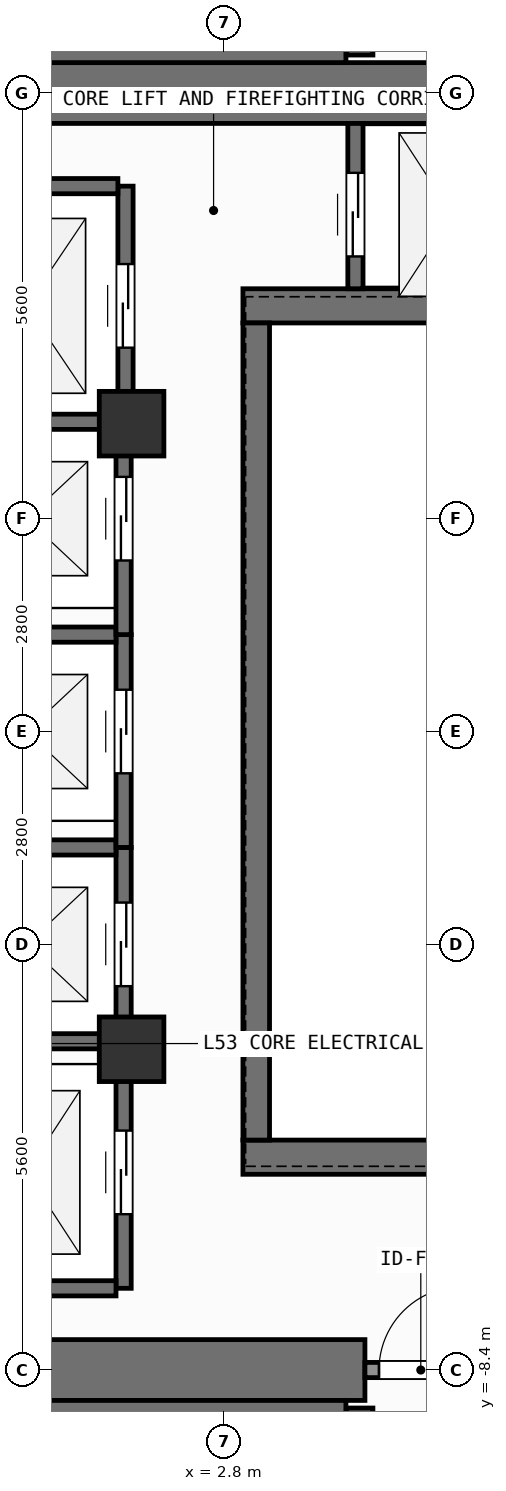
"""IFC4 building model, lengths in metres.
Left out: names, types, materials, properties, quantities, classifications, styles, units other than length and angle.
Written with IfcOpenShell. Run it as: python <this file> out.ifc"""

import sys

from ifc_helpers import new_model, si_unit, direction, frame, frame_2d, origin, origin_2d, place, context, subcontext, project, spatial, rectangle, extrude, element, fill, save


model = new_model("IFC4")
c1 = context("Model", 3, precision=1e-05, world=origin(), true_north=direction((0.0, 1.0)))
c2 = subcontext(c1, "Body", "Model", "MODEL_VIEW")
j1 = project(units=[si_unit("LENGTHUNIT", "METRE"), si_unit("PLANEANGLEUNIT", "RADIAN")], contexts=[c1])
p1 = place(None, origin())
s1 = spatial("IfcSite", under=j1, at=p1, CompositionType="ELEMENT")
p2 = place(p1, origin())
s2 = spatial("IfcBuilding", under=s1, at=p2, CompositionType="ELEMENT")
p3 = place(p2, frame((0.0, 0.0, 215.7)))
s3 = spatial("IfcBuildingStorey", under=s2, at=p3, CompositionType="ELEMENT", Elevation=215.7)
p4 = place(p3, frame((-2.62, -8.4, 0.0), z_axis=(0.0, 0.0, 1.0), x_axis=(1.0, 0.0, 0.0)))
e1 = element("IfcWall", 1, at=p4, inside=s3, PredefinedType="SHEAR", context=c2, shape_type="SweptSolid", body=[
    extrude(rectangle(XDim=7.27, YDim=0.8, at=frame_2d((3.635, 0.0))), origin(), (0.0, 0.0, 1.0), 3.9),
])
p5 = place(p3, frame((-7.55, 8.4, 0.0), z_axis=(0.0, 0.0, 1.0), x_axis=(1.0, 0.0, 0.0)))
e2 = element("IfcWall", 2, at=p5, inside=s3, PredefinedType="SHEAR", context=c2, shape_type="SweptSolid", body=[
    extrude(rectangle(XDim=16.35, YDim=0.8, at=frame_2d((8.175, 0.0))), origin(), (0.0, 0.0, 1.0), 3.9),
])
for number, where, z_axis, x_axis in (
    (3, (3.045, -5.6, 0.0), (0.0, 0.0, 1.0), (1.0, 0.0, 0.0)),
    (4, (3.045, 5.6, 0.0), (0.0, 0.0, 1.0), (1.0, 0.0, 0.0)),
):
    element("IfcWall", number, at=place(p3, frame(where, z_axis=z_axis, x_axis=x_axis)), inside=s3, PredefinedType="SHEAR", context=c2, shape_type="SweptSolid", body=[
        extrude(rectangle(XDim=5.755, YDim=0.45, at=frame_2d((2.877, 0.0))), origin(), (0.0, 0.0, 1.0), 3.9),
    ])
p6 = place(p3, frame((3.22, -5.375, 0.0), z_axis=(0.0, 0.0, 1.0), x_axis=(0.0, 1.0, 0.0)))
e5 = element("IfcWall", 5, at=p6, inside=s3, PredefinedType="SHEAR", context=c2, shape_type="SweptSolid", body=[
    extrude(rectangle(XDim=10.75, YDim=0.35, at=frame_2d((5.375, 0.0))), origin(), (0.0, 0.0, 1.0), 3.9),
])
p7 = place(p3, frame((-2.2, -8.913, 0.0), z_axis=(0.0, 0.0, 1.0), x_axis=(1.0, 0.0, 0.0)))
e6 = element("IfcWall", 6, at=p7, inside=s3, PredefinedType="SHEAR", context=c2, shape_type="SweptSolid", body=[
    extrude(rectangle(XDim=6.6, YDim=0.225, at=frame_2d((3.3, 0.0))), origin(), (0.0, 0.0, 1.0), 3.9),
])
p8 = place(p3, frame((4.58, -8.9, 0.0), z_axis=(0.0, 0.0, 1.0), x_axis=(0.0, -1.0, 0.0)))
e7 = element("IfcWall", 7, at=p8, inside=s3, PredefinedType="SHEAR", context=c2, shape_type="SweptSolid", body=[
    extrude(rectangle(XDim=2.925, YDim=0.35, at=frame_2d((1.462, 0.0))), origin(), (0.0, 0.0, 1.0), 3.9),
])
p9 = place(p8, frame((0.913, 0.0, 0.0)))
e8 = element("IfcOpeningElement", 8, at=p9, cuts=e7, PredefinedType="OPENING", context=c2, shape_type="SweptSolid", body=[
    extrude(rectangle(XDim=1.1, YDim=2.15, at=frame_2d((0.55, 1.075))), frame((0.0, 0.185, 0.0), z_axis=(0.0, -1.0, 0.0), x_axis=(1.0, 0.0, 0.0)), (0.0, 0.0, 1.0), 0.37),
])
p10 = place(p3, frame((-2.2, 8.913, 0.0), z_axis=(0.0, 0.0, 1.0), x_axis=(1.0, 0.0, 0.0)))
e9 = element("IfcWall", 9, at=p10, inside=s3, PredefinedType="SHEAR", context=c2, shape_type="SweptSolid", body=[
    extrude(rectangle(XDim=6.6, YDim=0.225, at=frame_2d((3.3, 0.0))), origin(), (0.0, 0.0, 1.0), 3.9),
])
p11 = place(p3, frame((4.58, 11.825, 0.0), z_axis=(0.0, 0.0, 1.0), x_axis=(0.0, -1.0, 0.0)))
e10 = element("IfcWall", 10, at=p11, inside=s3, PredefinedType="SHEAR", context=c2, shape_type="SweptSolid", body=[
    extrude(rectangle(XDim=2.925, YDim=0.35, at=frame_2d((1.462, 0.0))), origin(), (0.0, 0.0, 1.0), 3.9),
])
p12 = place(p11, frame((0.913, 0.0, 0.0)))
e11 = element("IfcOpeningElement", 11, at=p12, cuts=e10, PredefinedType="OPENING", context=c2, shape_type="SweptSolid", body=[
    extrude(rectangle(XDim=1.1, YDim=2.15, at=frame_2d((0.55, 1.075))), frame((0.0, 0.185, 0.0), z_axis=(0.0, -1.0, 0.0), x_axis=(1.0, 0.0, 0.0)), (0.0, 0.0, 1.0), 0.37),
])
for number, where, z_axis, x_axis in (
    (12, (1.58, -4.18, 0.0), (0.0, 0.0, 1.0), (1.0, 0.0, 0.0)),
    (13, (1.58, 4.05, 0.0), (0.0, 0.0, 1.0), (1.0, 0.0, 0.0)),
):
    element("IfcColumn", number, at=place(p3, frame(where, z_axis=z_axis, x_axis=x_axis)), inside=s3, PredefinedType="COLUMN", context=c2, shape_type="SweptSolid", body=[
        extrude(rectangle(XDim=0.85, YDim=0.85, at=origin_2d()), origin(), (0.0, 0.0, 1.0), 3.9),
    ])
p13 = place(p3, frame((1.475, -4.275, 0.0), z_axis=(0.0, 0.0, 1.0), x_axis=(0.0, 1.0, 0.0)))
e14 = element("IfcWall", 14, at=p13, inside=s3, PredefinedType="SHEAR", context=c2, shape_type="SweptSolid", body=[
    extrude(rectangle(XDim=2.75, YDim=0.2, at=frame_2d((1.375, 0.0))), origin(), (0.0, 0.0, 1.0), 3.62),
])
p14 = place(p13, frame((0.925, 0.0, 0.0)))
e15 = element("IfcOpeningElement", 15, at=p14, cuts=e14, PredefinedType="OPENING", context=c2, shape_type="SweptSolid", body=[
    extrude(rectangle(XDim=1.1, YDim=2.2, at=frame_2d((0.55, 1.1))), frame((0.0, 0.11, 0.0), z_axis=(0.0, -1.0, 0.0), x_axis=(1.0, 0.0, 0.0)), (0.0, 0.0, 1.0), 0.22),
])
for number, where, z_axis, x_axis in (
    (16, (-0.975, -4.075, 0.0), (0.0, 0.0, 1.0), (1.0, 0.0, 0.0)),
    (17, (-0.975, -1.525, 0.0), (0.0, 0.0, 1.0), (1.0, 0.0, 0.0)),
):
    element("IfcWall", number, at=place(p3, frame(where, z_axis=z_axis, x_axis=x_axis)), inside=s3, PredefinedType="SHEAR", context=c2, shape_type="SweptSolid", body=[
        extrude(rectangle(XDim=2.35, YDim=0.2, at=frame_2d((1.175, 0.0))), origin(), (0.0, 0.0, 1.0), 3.62),
    ])
p15 = place(p3, frame((1.475, -1.525, 0.0), z_axis=(0.0, 0.0, 1.0), x_axis=(0.0, 1.0, 0.0)))
e18 = element("IfcWall", 18, at=p15, inside=s3, PredefinedType="SHEAR", context=c2, shape_type="SweptSolid", body=[
    extrude(rectangle(XDim=2.8, YDim=0.2, at=frame_2d((1.4, 0.0))), origin(), (0.0, 0.0, 1.0), 3.62),
])
p16 = place(p15, frame((0.975, 0.0, 0.0)))
e19 = element("IfcOpeningElement", 19, at=p16, cuts=e18, PredefinedType="OPENING", context=c2, shape_type="SweptSolid", body=[
    extrude(rectangle(XDim=1.1, YDim=2.2, at=frame_2d((0.55, 1.1))), frame((0.0, 0.11, 0.0), z_axis=(0.0, -1.0, 0.0), x_axis=(1.0, 0.0, 0.0)), (0.0, 0.0, 1.0), 0.22),
])
p17 = place(p3, frame((-0.975, 1.275, 0.0), z_axis=(0.0, 0.0, 1.0), x_axis=(1.0, 0.0, 0.0)))
e20 = element("IfcWall", 20, at=p17, inside=s3, PredefinedType="SHEAR", context=c2, shape_type="SweptSolid", body=[
    extrude(rectangle(XDim=2.35, YDim=0.2, at=frame_2d((1.175, 0.0))), origin(), (0.0, 0.0, 1.0), 3.62),
])
p18 = place(p3, frame((1.475, 1.275, 0.0), z_axis=(0.0, 0.0, 1.0), x_axis=(0.0, 1.0, 0.0)))
e21 = element("IfcWall", 21, at=p18, inside=s3, PredefinedType="SHEAR", context=c2, shape_type="SweptSolid", body=[
    extrude(rectangle(XDim=2.8, YDim=0.2, at=frame_2d((1.4, 0.0))), origin(), (0.0, 0.0, 1.0), 3.62),
])
p19 = place(p18, frame((0.975, 0.0, 0.0)))
e22 = element("IfcOpeningElement", 22, at=p19, cuts=e21, PredefinedType="OPENING", context=c2, shape_type="SweptSolid", body=[
    extrude(rectangle(XDim=1.1, YDim=2.2, at=frame_2d((0.55, 1.1))), frame((0.0, 0.11, 0.0), z_axis=(0.0, -1.0, 0.0), x_axis=(1.0, 0.0, 0.0)), (0.0, 0.0, 1.0), 0.22),
])
p20 = place(p3, frame((-0.975, 4.075, 0.0), z_axis=(0.0, 0.0, 1.0), x_axis=(1.0, 0.0, 0.0)))
e23 = element("IfcWall", 23, at=p20, inside=s3, PredefinedType="SHEAR", context=c2, shape_type="SweptSolid", body=[
    extrude(rectangle(XDim=2.35, YDim=0.2, at=frame_2d((1.175, 0.0))), origin(), (0.0, 0.0, 1.0), 3.62),
])
p21 = place(p3, frame((1.5, 4.025, 0.0), z_axis=(0.0, 0.0, 1.0), x_axis=(0.0, 1.0, 0.0)))
e24 = element("IfcWall", 24, at=p21, inside=s3, PredefinedType="SHEAR", context=c2, shape_type="SweptSolid", body=[
    extrude(rectangle(XDim=3.15, YDim=0.2, at=frame_2d((1.575, 0.0))), origin(), (0.0, 0.0, 1.0), 3.62),
])
p22 = place(p21, frame((1.025, 0.0, 0.0)))
e25 = element("IfcOpeningElement", 25, at=p22, cuts=e24, PredefinedType="OPENING", context=c2, shape_type="SweptSolid", body=[
    extrude(rectangle(XDim=1.1, YDim=2.2, at=frame_2d((0.55, 1.1))), frame((0.0, 0.11, 0.0), z_axis=(0.0, -1.0, 0.0), x_axis=(1.0, 0.0, 0.0)), (0.0, 0.0, 1.0), 0.22),
])
p23 = place(p3, frame((-1.0, 7.175, 0.0), z_axis=(0.0, 0.0, 1.0), x_axis=(1.0, 0.0, 0.0)))
e26 = element("IfcWall", 26, at=p23, inside=s3, PredefinedType="SHEAR", context=c2, shape_type="SweptSolid", body=[
    extrude(rectangle(XDim=2.4, YDim=0.2, at=frame_2d((1.2, 0.0))), origin(), (0.0, 0.0, 1.0), 3.62),
])
p24 = place(p3, frame((1.475, -7.325, 0.0), z_axis=(0.0, 0.0, 1.0), x_axis=(0.0, 1.0, 0.0)))
e27 = element("IfcWall", 27, at=p24, inside=s3, PredefinedType="SHEAR", context=c2, shape_type="SweptSolid", body=[
    extrude(rectangle(XDim=3.05, YDim=0.2, at=frame_2d((1.525, 0.0))), origin(), (0.0, 0.0, 1.0), 3.62),
])
p25 = place(p24, frame((0.975, 0.0, 0.0)))
e28 = element("IfcOpeningElement", 28, at=p25, cuts=e27, PredefinedType="OPENING", context=c2, shape_type="SweptSolid", body=[
    extrude(rectangle(XDim=1.1, YDim=2.2, at=frame_2d((0.55, 1.1))), frame((0.0, 0.11, 0.0), z_axis=(0.0, -1.0, 0.0), x_axis=(1.0, 0.0, 0.0)), (0.0, 0.0, 1.0), 0.22),
])
p26 = place(p3, frame((-0.975, -7.325, 0.0), z_axis=(0.0, 0.0, 1.0), x_axis=(1.0, 0.0, 0.0)))
e29 = element("IfcWall", 29, at=p26, inside=s3, PredefinedType="SHEAR", context=c2, shape_type="SweptSolid", body=[
    extrude(rectangle(XDim=2.35, YDim=0.2, at=frame_2d((1.175, 0.0))), origin(), (0.0, 0.0, 1.0), 3.62),
])
p27 = place(p3, frame((4.525, 5.825, 0.0), z_axis=(0.0, 0.0, 1.0), x_axis=(0.0, 1.0, 0.0)))
e30 = element("IfcWall", 30, at=p27, inside=s3, PredefinedType="SHEAR", context=c2, shape_type="SweptSolid", body=[
    extrude(rectangle(XDim=2.175, YDim=0.2, at=frame_2d((1.087, 0.0))), origin(), (0.0, 0.0, 1.0), 3.62),
])
p28 = place(p27, frame((0.425, 0.0, 0.0)))
e31 = element("IfcOpeningElement", 31, at=p28, cuts=e30, PredefinedType="OPENING", context=c2, shape_type="SweptSolid", body=[
    extrude(rectangle(XDim=1.1, YDim=2.2, at=frame_2d((0.55, 1.1))), frame((0.0, 0.11, 0.0), z_axis=(0.0, -1.0, 0.0), x_axis=(1.0, 0.0, 0.0)), (0.0, 0.0, 1.0), 0.22),
])
p29 = place(p3, frame((4.65, -8.4, 0.0), z_axis=(0.0, 0.0, 1.0), x_axis=(1.0, 0.0, 0.0)))
e32 = element("IfcWall", 32, at=p29, inside=s3, PredefinedType="SOLIDWALL", context=c2, shape_type="SweptSolid", body=[
    extrude(rectangle(XDim=1.47, YDim=0.2, at=frame_2d((0.735, 0.0))), origin(), (0.0, 0.0, 1.0), 2.76),
])
p30 = place(p29, frame((0.185, 0.0, 0.0)))
e33 = element("IfcOpeningElement", 33, at=p30, cuts=e32, PredefinedType="OPENING", context=c2, shape_type="SweptSolid", body=[
    extrude(rectangle(XDim=1.1, YDim=2.15, at=frame_2d((0.55, 1.075))), frame((0.0, 0.11, 0.0), z_axis=(0.0, -1.0, 0.0), x_axis=(1.0, 0.0, 0.0)), (0.0, 0.0, 1.0), 0.22),
])
p31 = place(p14, origin())
e34 = element("IfcDoor", 34, at=p31, inside=s3, OperationType="SLIDING_TO_LEFT", PredefinedType="DOOR", context=c2, shape_type="SweptSolid", body=[
    extrude(rectangle(XDim=1.1, YDim=2.2, at=frame_2d((0.55, 1.1))), frame((0.0, 0.025, 0.0), z_axis=(0.0, -1.0, 0.0), x_axis=(1.0, 0.0, 0.0)), (0.0, 0.0, 1.0), 0.05),
])
fill(e15, e34)
p32 = place(p16, origin())
e35 = element("IfcDoor", 35, at=p32, inside=s3, OperationType="SLIDING_TO_LEFT", PredefinedType="DOOR", context=c2, shape_type="SweptSolid", body=[
    extrude(rectangle(XDim=1.1, YDim=2.2, at=frame_2d((0.55, 1.1))), frame((0.0, 0.025, 0.0), z_axis=(0.0, -1.0, 0.0), x_axis=(1.0, 0.0, 0.0)), (0.0, 0.0, 1.0), 0.05),
])
fill(e19, e35)
p33 = place(p19, origin())
e36 = element("IfcDoor", 36, at=p33, inside=s3, OperationType="SLIDING_TO_LEFT", PredefinedType="DOOR", context=c2, shape_type="SweptSolid", body=[
    extrude(rectangle(XDim=1.1, YDim=2.2, at=frame_2d((0.55, 1.1))), frame((0.0, 0.025, 0.0), z_axis=(0.0, -1.0, 0.0), x_axis=(1.0, 0.0, 0.0)), (0.0, 0.0, 1.0), 0.05),
])
fill(e22, e36)
p34 = place(p22, origin())
e37 = element("IfcDoor", 37, at=p34, inside=s3, OperationType="SLIDING_TO_LEFT", PredefinedType="DOOR", context=c2, shape_type="SweptSolid", body=[
    extrude(rectangle(XDim=1.1, YDim=2.2, at=frame_2d((0.55, 1.1))), frame((0.0, 0.025, 0.0), z_axis=(0.0, -1.0, 0.0), x_axis=(1.0, 0.0, 0.0)), (0.0, 0.0, 1.0), 0.05),
])
fill(e25, e37)
p35 = place(p25, origin())
e38 = element("IfcDoor", 38, at=p35, inside=s3, OperationType="SLIDING_TO_LEFT", PredefinedType="DOOR", context=c2, shape_type="SweptSolid", body=[
    extrude(rectangle(XDim=1.1, YDim=2.2, at=frame_2d((0.55, 1.1))), frame((0.0, 0.025, 0.0), z_axis=(0.0, -1.0, 0.0), x_axis=(1.0, 0.0, 0.0)), (0.0, 0.0, 1.0), 0.05),
])
fill(e28, e38)
p36 = place(p28, origin())
e39 = element("IfcDoor", 39, at=p36, inside=s3, OperationType="SLIDING_TO_LEFT", PredefinedType="DOOR", context=c2, shape_type="SweptSolid", body=[
    extrude(rectangle(XDim=1.1, YDim=2.2, at=frame_2d((0.55, 1.1))), frame((0.0, 0.025, 0.0), z_axis=(0.0, -1.0, 0.0), x_axis=(1.0, 0.0, 0.0)), (0.0, 0.0, 1.0), 0.05),
])
fill(e31, e39)
p37 = place(p30, origin())
e40 = element("IfcDoor", 40, at=p37, inside=s3, OperationType="SINGLE_SWING_RIGHT", PredefinedType="DOOR", context=c2, shape_type="SweptSolid", body=[
    extrude(rectangle(XDim=1.1, YDim=2.15, at=frame_2d((0.55, 1.075))), frame((0.0, 0.025, 0.0), z_axis=(0.0, -1.0, 0.0), x_axis=(1.0, 0.0, 0.0)), (0.0, 0.0, 1.0), 0.05),
])
fill(e33, e40)
save(model, sys.argv[1])
